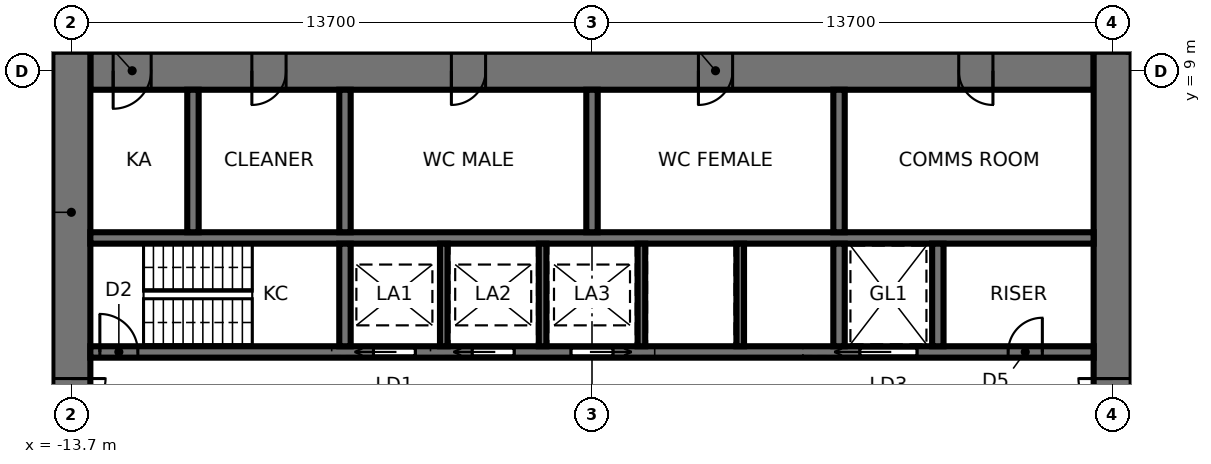
"""IFC4 building model, lengths in metres.
Left out: names, types, materials, properties, quantities, classifications, styles, units other than length and angle.
Written with IfcOpenShell. Run it as: python <this file> out.ifc"""

import sys

from ifc_helpers import new_model, si_unit, direction, frame, frame_2d, origin, place, context, subcontext, project, spatial, rectangle, extrude, element, fill, save


model = new_model("IFC4")
c1 = context("Model", 3, precision=1e-05, world=origin(), true_north=direction((0.0, 1.0)))
c2 = subcontext(c1, "Body", "Model", "MODEL_VIEW")
j1 = project(units=[si_unit("LENGTHUNIT", "METRE"), si_unit("PLANEANGLEUNIT", "RADIAN")], contexts=[c1])
p1 = place(None, origin())
s1 = spatial("IfcSite", under=j1, at=p1, CompositionType="ELEMENT")
p2 = place(p1, origin())
s2 = spatial("IfcBuilding", under=s1, at=p2, CompositionType="ELEMENT")
p3 = place(p2, frame((0.0, 0.0, 78.4)))
s3 = spatial("IfcBuildingStorey", under=s2, at=p3, CompositionType="ELEMENT", Elevation=78.4)
p4 = place(p3, frame((13.2, 9.0, 0.0), z_axis=(0.0, 0.0, 1.0), x_axis=(-1.0, 0.0, 0.0)))
e1 = element("IfcWall", 1, at=p4, inside=s3, PredefinedType="SHEAR", context=c2, shape_type="SweptSolid", body=[
    extrude(rectangle(XDim=26.4, YDim=1.0, at=frame_2d((13.2, 0.0))), origin(), (0.0, 0.0, 1.0), 4.2),
])
p5 = place(p4, frame((2.65, 0.0, 0.0)))
e2 = element("IfcOpeningElement", 2, at=p5, cuts=e1, PredefinedType="OPENING", context=c2, shape_type="SweptSolid", body=[
    extrude(rectangle(XDim=0.9, YDim=2.1, at=frame_2d((0.45, 1.05))), frame((0.0, 0.51, 0.0), z_axis=(0.0, -1.0, 0.0), x_axis=(1.0, 0.0, 0.0)), (0.0, 0.0, 1.0), 1.02),
])
p6 = place(p4, frame((9.5, 0.0, 0.0)))
e3 = element("IfcOpeningElement", 3, at=p6, cuts=e1, PredefinedType="OPENING", context=c2, shape_type="SweptSolid", body=[
    extrude(rectangle(XDim=0.9, YDim=2.1, at=frame_2d((0.45, 1.05))), frame((0.0, 0.51, 0.0), z_axis=(0.0, -1.0, 0.0), x_axis=(1.0, 0.0, 0.0)), (0.0, 0.0, 1.0), 1.02),
])
p7 = place(p4, frame((16.0, 0.0, 0.0)))
e4 = element("IfcOpeningElement", 4, at=p7, cuts=e1, PredefinedType="OPENING", context=c2, shape_type="SweptSolid", body=[
    extrude(rectangle(XDim=0.9, YDim=2.1, at=frame_2d((0.45, 1.05))), frame((0.0, 0.51, 0.0), z_axis=(0.0, -1.0, 0.0), x_axis=(1.0, 0.0, 0.0)), (0.0, 0.0, 1.0), 1.02),
])
p8 = place(p4, frame((21.25, 0.0, 0.0)))
e5 = element("IfcOpeningElement", 5, at=p8, cuts=e1, PredefinedType="OPENING", context=c2, shape_type="SweptSolid", body=[
    extrude(rectangle(XDim=0.9, YDim=2.1, at=frame_2d((0.45, 1.05))), frame((0.0, 0.51, 0.0), z_axis=(0.0, -1.0, 0.0), x_axis=(1.0, 0.0, 0.0)), (0.0, 0.0, 1.0), 1.02),
])
p9 = place(p4, frame((24.8, 0.0, 0.0)))
e6 = element("IfcOpeningElement", 6, at=p9, cuts=e1, PredefinedType="OPENING", context=c2, shape_type="SweptSolid", body=[
    extrude(rectangle(XDim=1.0, YDim=2.1, at=frame_2d((0.5, 1.05))), frame((0.0, 0.51, 0.0), z_axis=(0.0, -1.0, 0.0), x_axis=(1.0, 0.0, 0.0)), (0.0, 0.0, 1.0), 1.02),
])
p10 = place(p3, frame((13.7, -9.5, 0.0), z_axis=(0.0, 0.0, 1.0), x_axis=(0.0, 1.0, 0.0)))
e7 = element("IfcWall", 7, at=p10, inside=s3, PredefinedType="SHEAR", context=c2, shape_type="SweptSolid", body=[
    extrude(rectangle(XDim=19.0, YDim=1.0, at=frame_2d((9.5, 0.0))), origin(), (0.0, 0.0, 1.0), 4.2),
])
p11 = place(p10, frame((8.6, 0.0, 0.0)))
e8 = element("IfcOpeningElement", 8, at=p11, cuts=e7, PredefinedType="OPENING", context=c2, shape_type="SweptSolid", body=[
    extrude(rectangle(XDim=1.8, YDim=2.4, at=frame_2d((0.9, 1.2))), frame((0.0, 0.51, 0.0), z_axis=(0.0, -1.0, 0.0), x_axis=(1.0, 0.0, 0.0)), (0.0, 0.0, 1.0), 1.02),
])
p12 = place(p3, frame((-13.7, 9.5, 0.0), z_axis=(0.0, 0.0, 1.0), x_axis=(0.0, -1.0, 0.0)))
e9 = element("IfcWall", 9, at=p12, inside=s3, PredefinedType="SHEAR", context=c2, shape_type="SweptSolid", body=[
    extrude(rectangle(XDim=19.0, YDim=1.0, at=frame_2d((9.5, 0.0))), origin(), (0.0, 0.0, 1.0), 4.2),
])
p13 = place(p12, frame((8.6, 0.0, 0.0)))
e10 = element("IfcOpeningElement", 10, at=p13, cuts=e9, PredefinedType="OPENING", context=c2, shape_type="SweptSolid", body=[
    extrude(rectangle(XDim=1.8, YDim=2.4, at=frame_2d((0.9, 1.2))), frame((0.0, 0.51, 0.0), z_axis=(0.0, -1.0, 0.0), x_axis=(1.0, 0.0, 0.0)), (0.0, 0.0, 1.0), 1.02),
])
p14 = place(p3, frame((-13.2, 1.6, 0.0), z_axis=(0.0, 0.0, 1.0), x_axis=(1.0, 0.0, 0.0)))
e11 = element("IfcWall", 11, at=p14, inside=s3, PredefinedType="SHEAR", context=c2, shape_type="SweptSolid", body=[
    extrude(rectangle(XDim=26.4, YDim=0.3, at=frame_2d((13.2, 0.0))), origin(), (0.0, 0.0, 1.0), 4.2),
])
p15 = place(p14, frame((0.25, 0.0, 0.0)))
e12 = element("IfcOpeningElement", 12, at=p15, cuts=e11, PredefinedType="OPENING", context=c2, shape_type="SweptSolid", body=[
    extrude(rectangle(XDim=1.0, YDim=2.1, at=frame_2d((0.5, 1.05))), frame((0.0, 0.16, 0.0), z_axis=(0.0, -1.0, 0.0), x_axis=(1.0, 0.0, 0.0)), (0.0, 0.0, 1.0), 0.32),
])
p16 = place(p14, frame((20.25, 0.0, 0.0)))
e13 = element("IfcOpeningElement", 13, at=p16, cuts=e11, PredefinedType="OPENING", context=c2, shape_type="SweptSolid", body=[
    extrude(rectangle(XDim=1.5, YDim=2.4, at=frame_2d((0.75, 1.2))), frame((0.0, 0.16, 0.0), z_axis=(0.0, -1.0, 0.0), x_axis=(1.0, 0.0, 0.0)), (0.0, 0.0, 1.0), 0.32),
])
p17 = place(p14, frame((7.45, 0.0, 0.0)))
e14 = element("IfcOpeningElement", 14, at=p17, cuts=e11, PredefinedType="OPENING", context=c2, shape_type="SweptSolid", body=[
    extrude(rectangle(XDim=1.1, YDim=2.3, at=frame_2d((0.55, 1.15))), frame((0.0, 0.16, 0.0), z_axis=(0.0, -1.0, 0.0), x_axis=(1.0, 0.0, 0.0)), (0.0, 0.0, 1.0), 0.32),
])
p18 = place(p14, frame((10.05, 0.0, 0.0)))
e15 = element("IfcOpeningElement", 15, at=p18, cuts=e11, PredefinedType="OPENING", context=c2, shape_type="SweptSolid", body=[
    extrude(rectangle(XDim=1.1, YDim=2.3, at=frame_2d((0.55, 1.15))), frame((0.0, 0.16, 0.0), z_axis=(0.0, -1.0, 0.0), x_axis=(1.0, 0.0, 0.0)), (0.0, 0.0, 1.0), 0.32),
])
p19 = place(p14, frame((12.65, 0.0, 0.0)))
e16 = element("IfcOpeningElement", 16, at=p19, cuts=e11, PredefinedType="OPENING", context=c2, shape_type="SweptSolid", body=[
    extrude(rectangle(XDim=1.1, YDim=2.3, at=frame_2d((0.55, 1.15))), frame((0.0, 0.16, 0.0), z_axis=(0.0, -1.0, 0.0), x_axis=(1.0, 0.0, 0.0)), (0.0, 0.0, 1.0), 0.32),
])
p20 = place(p14, frame((24.15, 0.0, 0.0)))
e17 = element("IfcOpeningElement", 17, at=p20, cuts=e11, PredefinedType="OPENING", context=c2, shape_type="SweptSolid", body=[
    extrude(rectangle(XDim=0.9, YDim=2.1, at=frame_2d((0.45, 1.05))), frame((0.0, 0.16, 0.0), z_axis=(0.0, -1.0, 0.0), x_axis=(1.0, 0.0, 0.0)), (0.0, 0.0, 1.0), 0.32),
])
p21 = place(p3, frame((-13.2, 4.6, 0.0), z_axis=(0.0, 0.0, 1.0), x_axis=(1.0, 0.0, 0.0)))
e18 = element("IfcWall", 18, at=p21, inside=s3, PredefinedType="SHEAR", context=c2, shape_type="SweptSolid", body=[
    extrude(rectangle(XDim=26.4, YDim=0.3, at=frame_2d((13.2, 0.0))), origin(), (0.0, 0.0, 1.0), 4.2),
])
p22 = place(p3, frame((-6.5, 1.75, 0.0), z_axis=(0.0, 0.0, 1.0), x_axis=(0.0, 1.0, 0.0)))
e19 = element("IfcWall", 19, at=p22, inside=s3, PredefinedType="SHEAR", context=c2, shape_type="SweptSolid", body=[
    extrude(rectangle(XDim=2.7, YDim=0.3, at=frame_2d((1.35, 0.0))), origin(), (0.0, 0.0, 1.0), 4.2),
])
p23 = place(p3, frame((-6.5, 4.75, 0.0), z_axis=(0.0, 0.0, 1.0), x_axis=(0.0, 1.0, 0.0)))
e20 = element("IfcWall", 20, at=p23, inside=s3, PredefinedType="SHEAR", context=c2, shape_type="SweptSolid", body=[
    extrude(rectangle(XDim=3.75, YDim=0.3, at=frame_2d((1.875, 0.0))), origin(), (0.0, 0.0, 1.0), 4.2),
])
p24 = place(p3, frame((6.5, 1.75, 0.0), z_axis=(0.0, 0.0, 1.0), x_axis=(0.0, 1.0, 0.0)))
e21 = element("IfcWall", 21, at=p24, inside=s3, PredefinedType="SHEAR", context=c2, shape_type="SweptSolid", body=[
    extrude(rectangle(XDim=2.7, YDim=0.3, at=frame_2d((1.35, 0.0))), origin(), (0.0, 0.0, 1.0), 4.2),
])
p25 = place(p3, frame((6.5, 4.75, 0.0), z_axis=(0.0, 0.0, 1.0), x_axis=(0.0, 1.0, 0.0)))
e22 = element("IfcWall", 22, at=p25, inside=s3, PredefinedType="SHEAR", context=c2, shape_type="SweptSolid", body=[
    extrude(rectangle(XDim=3.75, YDim=0.3, at=frame_2d((1.875, 0.0))), origin(), (0.0, 0.0, 1.0), 4.2),
])
for number, where, z_axis, x_axis in (
    (23, (-3.9, 1.75, 0.0), (0.0, 0.0, 1.0), (0.0, 1.0, 0.0)),
    (24, (-1.3, 1.75, 0.0), (0.0, 0.0, 1.0), (0.0, 1.0, 0.0)),
    (25, (1.3, 1.75, 0.0), (0.0, 0.0, 1.0), (0.0, 1.0, 0.0)),
    (26, (3.9, 1.75, 0.0), (0.0, 0.0, 1.0), (0.0, 1.0, 0.0)),
):
    element("IfcWall", number, at=place(p3, frame(where, z_axis=z_axis, x_axis=x_axis)), inside=s3, PredefinedType="SHEAR", context=c2, shape_type="SweptSolid", body=[
        extrude(rectangle(XDim=2.7, YDim=0.2, at=frame_2d((1.35, 0.0))), origin(), (0.0, 0.0, 1.0), 4.2),
    ])
for number, where, z_axis, x_axis in (
    (27, (0.0, 4.75, 0.0), (0.0, 0.0, 1.0), (0.0, 1.0, 0.0)),
    (28, (-10.5, 4.75, 0.0), (0.0, 0.0, 1.0), (0.0, 1.0, 0.0)),
):
    element("IfcWall", number, at=place(p3, frame(where, z_axis=z_axis, x_axis=x_axis)), inside=s3, PredefinedType="SHEAR", context=c2, shape_type="SweptSolid", body=[
        extrude(rectangle(XDim=3.75, YDim=0.3, at=frame_2d((1.875, 0.0))), origin(), (0.0, 0.0, 1.0), 4.2),
    ])
p26 = place(p3, frame((9.1, 1.75, 0.0), z_axis=(0.0, 0.0, 1.0), x_axis=(0.0, 1.0, 0.0)))
e29 = element("IfcWall", 29, at=p26, inside=s3, PredefinedType="SHEAR", context=c2, shape_type="SweptSolid", body=[
    extrude(rectangle(XDim=2.7, YDim=0.3, at=frame_2d((1.35, 0.0))), origin(), (0.0, 0.0, 1.0), 4.2),
])
p27 = place(p3, frame((14.2, 9.5, 0.0), z_axis=(0.0, 0.0, 1.0), x_axis=(0.0, 1.0, 0.0)))
e30 = element("IfcWall", 30, at=p27, inside=s3, PredefinedType="PARTITIONING", context=c2, shape_type="SweptSolid", body=[
    extrude(rectangle(XDim=1.8, YDim=0.15, at=frame_2d((0.9, 0.0))), origin(), (0.0, 0.0, 1.0), 4.04),
])
p28 = place(p13, origin())
e31 = element("IfcDoor", 31, at=p28, inside=s3, OperationType="DOUBLE_DOOR_SINGLE_SWING", PredefinedType="DOOR", context=c2, shape_type="SweptSolid", body=[
    extrude(rectangle(XDim=1.72, YDim=2.36, at=frame_2d((0.9, 1.18))), frame((0.0, 0.025, 0.0), z_axis=(0.0, -1.0, 0.0), x_axis=(1.0, 0.0, 0.0)), (0.0, 0.0, 1.0), 0.05),
    extrude(rectangle(XDim=0.04, YDim=2.4, at=frame_2d((0.02, 1.2))), frame((0.0, 0.25, 0.0), z_axis=(0.0, -1.0, 0.0), x_axis=(1.0, 0.0, 0.0)), (0.0, 0.0, 1.0), 0.5),
    extrude(rectangle(XDim=0.04, YDim=2.4, at=frame_2d((1.78, 1.2))), frame((0.0, 0.25, 0.0), z_axis=(0.0, -1.0, 0.0), x_axis=(1.0, 0.0, 0.0)), (0.0, 0.0, 1.0), 0.5),
    extrude(rectangle(XDim=1.72, YDim=0.04, at=frame_2d((0.9, 2.38))), frame((0.0, 0.25, 0.0), z_axis=(0.0, -1.0, 0.0), x_axis=(1.0, 0.0, 0.0)), (0.0, 0.0, 1.0), 0.5),
])
fill(e10, e31)
p29 = place(p11, origin())
e32 = element("IfcDoor", 32, at=p29, inside=s3, OperationType="DOUBLE_DOOR_SINGLE_SWING", PredefinedType="DOOR", context=c2, shape_type="SweptSolid", body=[
    extrude(rectangle(XDim=1.72, YDim=2.36, at=frame_2d((0.9, 1.18))), frame((0.0, 0.025, 0.0), z_axis=(0.0, -1.0, 0.0), x_axis=(1.0, 0.0, 0.0)), (0.0, 0.0, 1.0), 0.05),
    extrude(rectangle(XDim=0.04, YDim=2.4, at=frame_2d((0.02, 1.2))), frame((0.0, 0.25, 0.0), z_axis=(0.0, -1.0, 0.0), x_axis=(1.0, 0.0, 0.0)), (0.0, 0.0, 1.0), 0.5),
    extrude(rectangle(XDim=0.04, YDim=2.4, at=frame_2d((1.78, 1.2))), frame((0.0, 0.25, 0.0), z_axis=(0.0, -1.0, 0.0), x_axis=(1.0, 0.0, 0.0)), (0.0, 0.0, 1.0), 0.5),
    extrude(rectangle(XDim=1.72, YDim=0.04, at=frame_2d((0.9, 2.38))), frame((0.0, 0.25, 0.0), z_axis=(0.0, -1.0, 0.0), x_axis=(1.0, 0.0, 0.0)), (0.0, 0.0, 1.0), 0.5),
])
fill(e8, e32)
p30 = place(p15, origin())
e33 = element("IfcDoor", 33, at=p30, inside=s3, OperationType="SINGLE_SWING_LEFT", PredefinedType="DOOR", context=c2, shape_type="SweptSolid", body=[
    extrude(rectangle(XDim=1.0, YDim=2.1, at=frame_2d((0.5, 1.05))), frame((0.0, 0.025, 0.0), z_axis=(0.0, -1.0, 0.0), x_axis=(1.0, 0.0, 0.0)), (0.0, 0.0, 1.0), 0.05),
])
fill(e12, e33)
p31 = place(p16, origin())
e34 = element("IfcDoor", 34, at=p31, inside=s3, OperationType="SLIDING_TO_LEFT", PredefinedType="DOOR", context=c2, shape_type="SweptSolid", body=[
    extrude(rectangle(XDim=1.5, YDim=2.4, at=frame_2d((0.75, 1.2))), frame((0.0, 0.025, 0.0), z_axis=(0.0, -1.0, 0.0), x_axis=(1.0, 0.0, 0.0)), (0.0, 0.0, 1.0), 0.05),
])
fill(e13, e34)
p32 = place(p17, origin())
e35 = element("IfcDoor", 35, at=p32, inside=s3, OperationType="SLIDING_TO_LEFT", PredefinedType="DOOR", context=c2, shape_type="SweptSolid", body=[
    extrude(rectangle(XDim=1.1, YDim=2.3, at=frame_2d((0.55, 1.15))), frame((0.0, 0.025, 0.0), z_axis=(0.0, -1.0, 0.0), x_axis=(1.0, 0.0, 0.0)), (0.0, 0.0, 1.0), 0.05),
])
fill(e14, e35)
p33 = place(p18, origin())
e36 = element("IfcDoor", 36, at=p33, inside=s3, OperationType="SLIDING_TO_LEFT", PredefinedType="DOOR", context=c2, shape_type="SweptSolid", body=[
    extrude(rectangle(XDim=1.1, YDim=2.3, at=frame_2d((0.55, 1.15))), frame((0.0, 0.025, 0.0), z_axis=(0.0, -1.0, 0.0), x_axis=(1.0, 0.0, 0.0)), (0.0, 0.0, 1.0), 0.05),
])
fill(e15, e36)
p34 = place(p19, origin())
e37 = element("IfcDoor", 37, at=p34, inside=s3, OperationType="SLIDING_TO_RIGHT", PredefinedType="DOOR", context=c2, shape_type="SweptSolid", body=[
    extrude(rectangle(XDim=1.1, YDim=2.3, at=frame_2d((0.55, 1.15))), frame((0.0, 0.025, 0.0), z_axis=(0.0, -1.0, 0.0), x_axis=(1.0, 0.0, 0.0)), (0.0, 0.0, 1.0), 0.05),
])
fill(e16, e37)
p35 = place(p20, origin())
e38 = element("IfcDoor", 38, at=p35, inside=s3, OperationType="SINGLE_SWING_RIGHT", PredefinedType="DOOR", context=c2, shape_type="SweptSolid", body=[
    extrude(rectangle(XDim=0.9, YDim=2.1, at=frame_2d((0.45, 1.05))), frame((0.0, 0.025, 0.0), z_axis=(0.0, -1.0, 0.0), x_axis=(1.0, 0.0, 0.0)), (0.0, 0.0, 1.0), 0.05),
])
fill(e17, e38)
p36 = place(p5, origin())
e39 = element("IfcDoor", 39, at=p36, inside=s3, OperationType="SINGLE_SWING_LEFT", PredefinedType="DOOR", context=c2, shape_type="SweptSolid", body=[
    extrude(rectangle(XDim=0.82, YDim=2.06, at=frame_2d((0.45, 1.03))), frame((0.0, 0.025, 0.0), z_axis=(0.0, -1.0, 0.0), x_axis=(1.0, 0.0, 0.0)), (0.0, 0.0, 1.0), 0.05),
    extrude(rectangle(XDim=0.04, YDim=2.1, at=frame_2d((0.02, 1.05))), frame((0.0, 0.25, 0.0), z_axis=(0.0, -1.0, 0.0), x_axis=(1.0, 0.0, 0.0)), (0.0, 0.0, 1.0), 0.5),
    extrude(rectangle(XDim=0.04, YDim=2.1, at=frame_2d((0.88, 1.05))), frame((0.0, 0.25, 0.0), z_axis=(0.0, -1.0, 0.0), x_axis=(1.0, 0.0, 0.0)), (0.0, 0.0, 1.0), 0.5),
    extrude(rectangle(XDim=0.82, YDim=0.04, at=frame_2d((0.45, 2.08))), frame((0.0, 0.25, 0.0), z_axis=(0.0, -1.0, 0.0), x_axis=(1.0, 0.0, 0.0)), (0.0, 0.0, 1.0), 0.5),
])
fill(e2, e39)
p37 = place(p6, origin())
e40 = element("IfcDoor", 40, at=p37, inside=s3, OperationType="SINGLE_SWING_RIGHT", PredefinedType="DOOR", context=c2, shape_type="SweptSolid", body=[
    extrude(rectangle(XDim=0.82, YDim=2.06, at=frame_2d((0.45, 1.03))), frame((0.0, 0.025, 0.0), z_axis=(0.0, -1.0, 0.0), x_axis=(1.0, 0.0, 0.0)), (0.0, 0.0, 1.0), 0.05),
    extrude(rectangle(XDim=0.04, YDim=2.1, at=frame_2d((0.02, 1.05))), frame((0.0, 0.25, 0.0), z_axis=(0.0, -1.0, 0.0), x_axis=(1.0, 0.0, 0.0)), (0.0, 0.0, 1.0), 0.5),
    extrude(rectangle(XDim=0.04, YDim=2.1, at=frame_2d((0.88, 1.05))), frame((0.0, 0.25, 0.0), z_axis=(0.0, -1.0, 0.0), x_axis=(1.0, 0.0, 0.0)), (0.0, 0.0, 1.0), 0.5),
    extrude(rectangle(XDim=0.82, YDim=0.04, at=frame_2d((0.45, 2.08))), frame((0.0, 0.25, 0.0), z_axis=(0.0, -1.0, 0.0), x_axis=(1.0, 0.0, 0.0)), (0.0, 0.0, 1.0), 0.5),
])
fill(e3, e40)
p38 = place(p7, origin())
e41 = element("IfcDoor", 41, at=p38, inside=s3, OperationType="SINGLE_SWING_RIGHT", PredefinedType="DOOR", context=c2, shape_type="SweptSolid", body=[
    extrude(rectangle(XDim=0.82, YDim=2.06, at=frame_2d((0.45, 1.03))), frame((0.0, 0.025, 0.0), z_axis=(0.0, -1.0, 0.0), x_axis=(1.0, 0.0, 0.0)), (0.0, 0.0, 1.0), 0.05),
    extrude(rectangle(XDim=0.04, YDim=2.1, at=frame_2d((0.02, 1.05))), frame((0.0, 0.25, 0.0), z_axis=(0.0, -1.0, 0.0), x_axis=(1.0, 0.0, 0.0)), (0.0, 0.0, 1.0), 0.5),
    extrude(rectangle(XDim=0.04, YDim=2.1, at=frame_2d((0.88, 1.05))), frame((0.0, 0.25, 0.0), z_axis=(0.0, -1.0, 0.0), x_axis=(1.0, 0.0, 0.0)), (0.0, 0.0, 1.0), 0.5),
    extrude(rectangle(XDim=0.82, YDim=0.04, at=frame_2d((0.45, 2.08))), frame((0.0, 0.25, 0.0), z_axis=(0.0, -1.0, 0.0), x_axis=(1.0, 0.0, 0.0)), (0.0, 0.0, 1.0), 0.5),
])
fill(e4, e41)
p39 = place(p8, origin())
e42 = element("IfcDoor", 42, at=p39, inside=s3, OperationType="SINGLE_SWING_RIGHT", PredefinedType="DOOR", context=c2, shape_type="SweptSolid", body=[
    extrude(rectangle(XDim=0.82, YDim=2.06, at=frame_2d((0.45, 1.03))), frame((0.0, 0.025, 0.0), z_axis=(0.0, -1.0, 0.0), x_axis=(1.0, 0.0, 0.0)), (0.0, 0.0, 1.0), 0.05),
    extrude(rectangle(XDim=0.04, YDim=2.1, at=frame_2d((0.02, 1.05))), frame((0.0, 0.25, 0.0), z_axis=(0.0, -1.0, 0.0), x_axis=(1.0, 0.0, 0.0)), (0.0, 0.0, 1.0), 0.5),
    extrude(rectangle(XDim=0.04, YDim=2.1, at=frame_2d((0.88, 1.05))), frame((0.0, 0.25, 0.0), z_axis=(0.0, -1.0, 0.0), x_axis=(1.0, 0.0, 0.0)), (0.0, 0.0, 1.0), 0.5),
    extrude(rectangle(XDim=0.82, YDim=0.04, at=frame_2d((0.45, 2.08))), frame((0.0, 0.25, 0.0), z_axis=(0.0, -1.0, 0.0), x_axis=(1.0, 0.0, 0.0)), (0.0, 0.0, 1.0), 0.5),
])
fill(e5, e42)
p40 = place(p9, origin())
e43 = element("IfcDoor", 43, at=p40, inside=s3, OperationType="SINGLE_SWING_RIGHT", PredefinedType="DOOR", context=c2, shape_type="SweptSolid", body=[
    extrude(rectangle(XDim=0.92, YDim=2.06, at=frame_2d((0.5, 1.03))), frame((0.0, 0.025, 0.0), z_axis=(0.0, -1.0, 0.0), x_axis=(1.0, 0.0, 0.0)), (0.0, 0.0, 1.0), 0.05),
    extrude(rectangle(XDim=0.04, YDim=2.1, at=frame_2d((0.02, 1.05))), frame((0.0, 0.25, 0.0), z_axis=(0.0, -1.0, 0.0), x_axis=(1.0, 0.0, 0.0)), (0.0, 0.0, 1.0), 0.5),
    extrude(rectangle(XDim=0.04, YDim=2.1, at=frame_2d((0.98, 1.05))), frame((0.0, 0.25, 0.0), z_axis=(0.0, -1.0, 0.0), x_axis=(1.0, 0.0, 0.0)), (0.0, 0.0, 1.0), 0.5),
    extrude(rectangle(XDim=0.92, YDim=0.04, at=frame_2d((0.5, 2.08))), frame((0.0, 0.25, 0.0), z_axis=(0.0, -1.0, 0.0), x_axis=(1.0, 0.0, 0.0)), (0.0, 0.0, 1.0), 0.5),
])
fill(e6, e43)
save(model, sys.argv[1])
